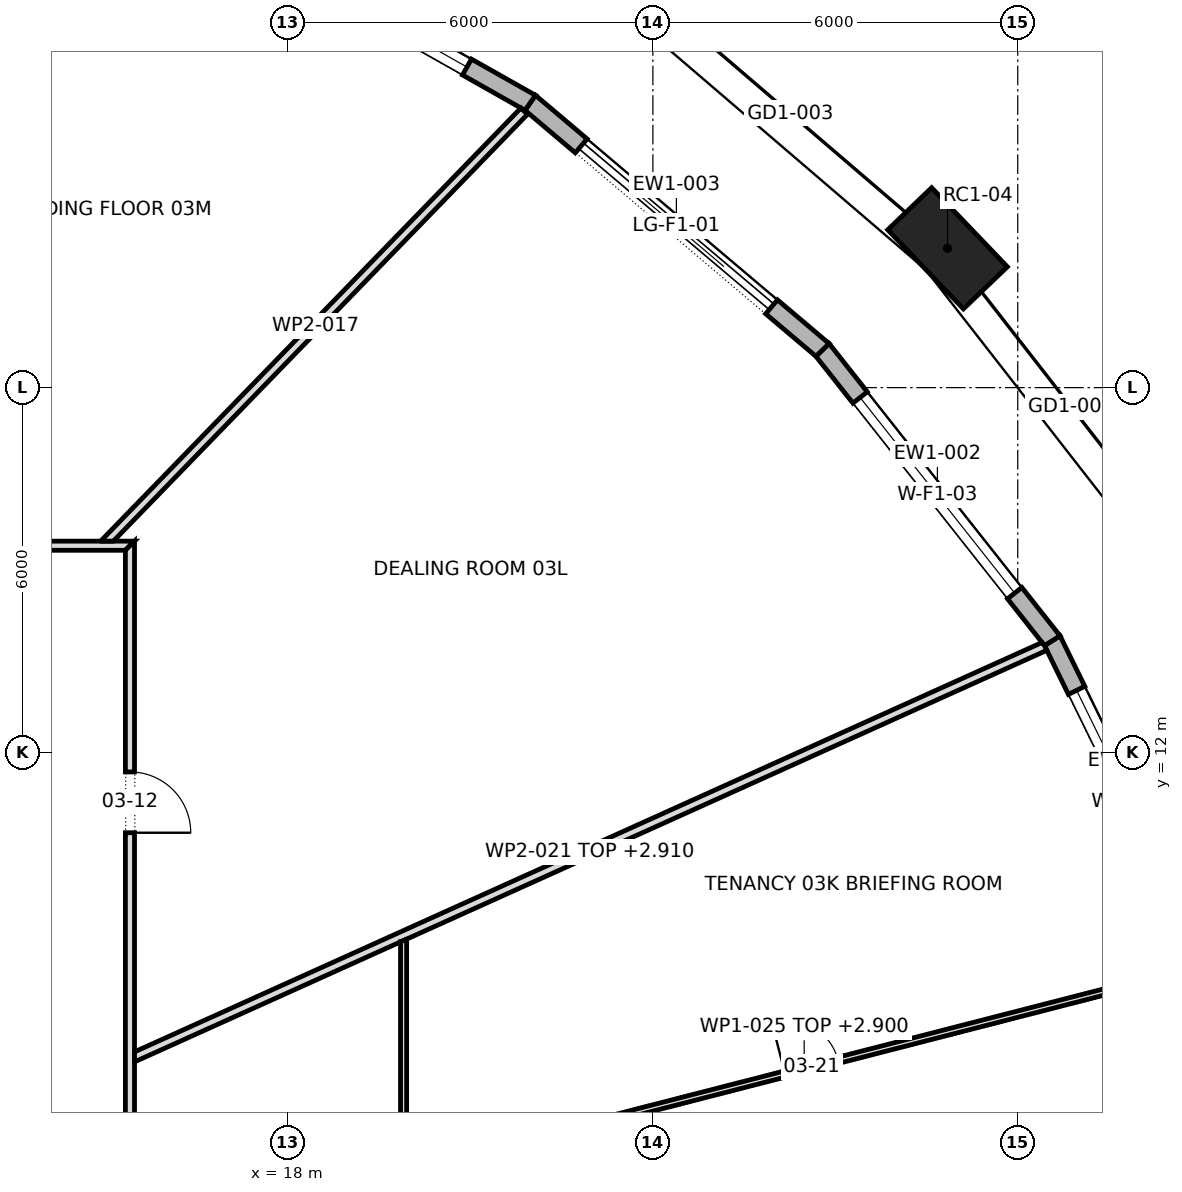
"""IFC4 building model, lengths in metres.
Left out: names, types, materials, properties, quantities, classifications, styles, units other than length and angle.
Written with IfcOpenShell. Run it as: python <this file> out.ifc"""

import sys

from ifc_helpers import new_model, si_unit, direction, frame, frame_2d, origin, origin_2d, place, context, subcontext, project, spatial, polyline, rectangle, outline, extrude, element, fill, save


model = new_model("IFC4")
c1 = context("Model", 3, precision=1e-05, world=origin(), true_north=direction((0.0, 1.0)))
c2 = subcontext(c1, "Body", "Model", "MODEL_VIEW")
j1 = project(units=[si_unit("LENGTHUNIT", "METRE"), si_unit("PLANEANGLEUNIT", "RADIAN")], contexts=[c1])
p1 = place(None, origin())
s1 = spatial("IfcSite", under=j1, at=p1, CompositionType="ELEMENT")
p2 = place(p1, origin())
s2 = spatial("IfcBuilding", under=s1, at=p2, CompositionType="ELEMENT")
p3 = place(p2, frame((0.0, 0.0, 48.7)))
s3 = spatial("IfcBuildingStorey", under=s2, at=p3, CompositionType="ELEMENT", Elevation=48.7)
p4 = place(p3, frame((28.845, 20.291, 0.0), z_axis=(0.0, 0.0, 1.0), x_axis=(-0.691576091297, 0.722303613411, 0.0)))
e1 = element("IfcColumn", 1, at=p4, inside=s3, PredefinedType="COLUMN", context=c2, shape_type="SweptSolid", body=[
    extrude(rectangle(XDim=1.8, YDim=1.0, at=origin_2d()), origin(), (0.0, 0.0, 1.0), 4.2),
])
p5 = place(p3, frame((33.172, 8.523, 0.0), z_axis=(0.0, 0.0, 1.0), x_axis=(-0.439906146647, 0.898043752911, 0.0)))
e2 = element("IfcWall", 2, at=p5, inside=s3, PredefinedType="STANDARD", context=c2, shape_type="SweptSolid", body=[
    extrude(outline(polyline([(-0.017, -0.15), (5.935, -0.15), (5.903, 0.15), (0.017, 0.15), (-0.017, -0.15)])), origin(), (0.0, 0.0, 1.0), 3.9),
])
p6 = place(p5, frame((0.909, 0.0, 0.6)))
e3 = element("IfcOpeningElement", 3, at=p6, cuts=e2, PredefinedType="OPENING", context=c2, shape_type="SweptSolid", body=[
    extrude(rectangle(XDim=4.1, YDim=2.85, at=frame_2d((2.05, 1.425))), frame((0.0, 0.162, 0.0), z_axis=(0.0, -1.0, 0.0), x_axis=(1.0, 0.0, 0.0)), (0.0, 0.0, 1.0), 0.324),
])
p7 = place(p3, frame((30.568, 13.838, 0.0), z_axis=(0.0, 0.0, 1.0), x_axis=(-0.619993638342, 0.78460683684, 0.0)))
e4 = element("IfcWall", 4, at=p7, inside=s3, PredefinedType="STANDARD", context=c2, shape_type="SweptSolid", body=[
    extrude(outline(polyline([(-0.016, -0.15), (6.109, -0.15), (6.079, 0.15), (0.016, 0.15), (-0.016, -0.15)])), origin(), (0.0, 0.0, 1.0), 3.9),
])
p8 = place(p7, frame((0.997, 0.0, 0.6)))
e5 = element("IfcOpeningElement", 5, at=p8, cuts=e4, PredefinedType="OPENING", context=c2, shape_type="SweptSolid", body=[
    extrude(rectangle(XDim=4.1, YDim=2.85, at=frame_2d((2.05, 1.425))), frame((0.0, 0.162, 0.0), z_axis=(0.0, -1.0, 0.0), x_axis=(1.0, 0.0, 0.0)), (0.0, 0.0, 1.0), 0.324),
])
p9 = place(p3, frame((26.79, 18.62, 0.0), z_axis=(0.0, 0.0, 1.0), x_axis=(-0.763614259808, 0.645672720671, 0.0)))
e6 = element("IfcWall", 6, at=p9, inside=s3, PredefinedType="STANDARD", context=c2, shape_type="SweptSolid", body=[
    extrude(outline(polyline([(-0.015, -0.15), (6.309, -0.15), (6.281, 0.15), (0.015, 0.15), (-0.015, -0.15)])), origin(), (0.0, 0.0, 1.0), 3.9),
])
p10 = place(p9, frame((1.097, 0.0, 0.0)))
e7 = element("IfcOpeningElement", 7, at=p10, cuts=e6, PredefinedType="OPENING", context=c2, shape_type="SweptSolid", body=[
    extrude(rectangle(XDim=4.1, YDim=3.45, at=frame_2d((2.05, 1.725))), frame((0.0, 0.162, 0.0), z_axis=(0.0, -1.0, 0.0), x_axis=(1.0, 0.0, 0.0)), (0.0, 0.0, 1.0), 0.324),
])
p11 = place(p3, frame((21.983, 22.684, 0.0), z_axis=(0.0, 0.0, 1.0), x_axis=(-0.870647609977, 0.491907246584, 0.0)))
e8 = element("IfcWall", 8, at=p11, inside=s3, PredefinedType="STANDARD", context=c2, shape_type="SweptSolid", body=[
    extrude(outline(polyline([(-0.014, -0.15), (6.503, -0.15), (6.476, 0.15), (0.014, 0.15), (-0.014, -0.15)])), origin(), (0.0, 0.0, 1.0), 3.9),
])
p12 = place(p11, frame((1.195, 0.0, 0.6)))
e9 = element("IfcOpeningElement", 9, at=p12, cuts=e8, PredefinedType="OPENING", context=c2, shape_type="SweptSolid", body=[
    extrude(rectangle(XDim=4.1, YDim=2.85, at=frame_2d((2.05, 1.425))), frame((0.0, 0.162, 0.0), z_axis=(0.0, -1.0, 0.0), x_axis=(1.0, 0.0, 0.0)), (0.0, 0.0, 1.0), 0.324),
])
p13 = place(p3, frame((-15.475, 15.4, 0.0), z_axis=(0.0, 0.0, 1.0), x_axis=(1.0, 0.0, 0.0)))
e10 = element("IfcWall", 10, at=p13, inside=s3, PredefinedType="PARTITIONING", context=c2, shape_type="SweptSolid", body=[
    extrude(outline(polyline([(0.15, -0.075), (2.066, -0.075), (3.981, -0.075), (5.897, -0.075), (7.812, -0.075), (9.728, -0.075), (11.644, -0.075), (13.56, -0.075), (15.475, -0.075), (17.391, -0.075), (19.306, -0.075), (21.222, -0.075), (23.138, -0.075), (25.053, -0.075), (26.969, -0.075), (28.885, -0.075), (30.8, -0.075), (30.95, 0.075), (29.016, 0.075), (27.081, 0.075), (25.147, 0.075), (23.212, 0.075), (21.278, 0.075), (19.344, 0.075), (17.409, 0.075), (15.475, 0.075), (13.541, 0.075), (11.606, 0.075), (9.672, 0.075), (7.738, 0.075), (5.803, 0.075), (3.869, 0.075), (1.935, 0.075), (0.0, 0.075), (0.15, -0.075)])), origin(), (0.0, 0.0, 1.0), 3.9),
])
p14 = place(p13, frame((16.84, 0.0, 0.0)))
e11 = element("IfcOpeningElement", 11, at=p14, cuts=e10, PredefinedType="OPENING", context=c2, shape_type="SweptSolid", body=[
    extrude(rectangle(XDim=1.0, YDim=2.1, at=frame_2d((0.5, 1.05))), frame((0.0, 0.087, 0.0), z_axis=(0.0, -1.0, 0.0), x_axis=(1.0, 0.0, 0.0)), (0.0, 0.0, 1.0), 0.174),
])
p15 = place(p13, frame((9.215, 0.0, 0.0)))
e12 = element("IfcOpeningElement", 12, at=p15, cuts=e10, PredefinedType="OPENING", context=c2, shape_type="SweptSolid", body=[
    extrude(rectangle(XDim=1.0, YDim=2.1, at=frame_2d((0.5, 1.05))), frame((0.0, 0.087, 0.0), z_axis=(0.0, -1.0, 0.0), x_axis=(1.0, 0.0, 0.0)), (0.0, 0.0, 1.0), 0.174),
])
p16 = place(p13, frame((25.21, 0.0, 0.0)))
e13 = element("IfcOpeningElement", 13, at=p16, cuts=e10, PredefinedType="OPENING", context=c2, shape_type="SweptSolid", body=[
    extrude(rectangle(XDim=1.0, YDim=2.1, at=frame_2d((0.5, 1.05))), frame((0.0, 0.087, 0.0), z_axis=(0.0, -1.0, 0.0), x_axis=(1.0, 0.0, 0.0)), (0.0, 0.0, 1.0), 0.174),
])
p17 = place(p3, frame((14.972, 15.423, 0.0), z_axis=(0.0, 0.0, 1.0), x_axis=(0.696324469813, 0.717727129722, 0.0)))
e14 = element("IfcWall", 14, at=p17, inside=s3, PredefinedType="PARTITIONING", context=c2, shape_type="SweptSolid", body=[
    extrude(outline(polyline([(0.0, 0.075), (0.0, 0.074), (0.145, -0.075), (2.101, -0.075), (4.057, -0.075), (6.012, -0.075), (7.968, -0.075), (9.924, -0.075), (9.924, 0.075), (7.939, 0.075), (5.954, 0.075), (3.97, 0.075), (1.985, 0.075), (0.0, 0.075)])), origin(), (0.0, 0.0, 1.0), 3.9),
])
p18 = place(p3, frame((15.4, -15.475, 0.0), z_axis=(0.0, 0.0, 1.0), x_axis=(0.0, 1.0, 0.0)))
e15 = element("IfcWall", 15, at=p18, inside=s3, PredefinedType="PARTITIONING", context=c2, shape_type="SweptSolid", body=[
    extrude(outline(polyline([(0.0, -0.075), (1.935, -0.075), (3.869, -0.075), (5.803, -0.075), (7.738, -0.075), (9.672, -0.075), (11.606, -0.075), (13.541, -0.075), (15.475, -0.075), (17.409, -0.075), (19.344, -0.075), (21.278, -0.075), (23.212, -0.075), (25.147, -0.075), (27.081, -0.075), (29.016, -0.075), (30.95, -0.075), (30.8, 0.075), (28.885, 0.075), (26.969, 0.075), (25.053, 0.075), (23.138, 0.075), (21.222, 0.075), (19.306, 0.075), (17.391, 0.075), (15.475, 0.075), (13.56, 0.075), (11.644, 0.075), (9.728, 0.075), (7.812, 0.075), (5.897, 0.075), (3.981, 0.075), (2.066, 0.075), (0.15, 0.075), (0.0, -0.075)])), origin(), (0.0, 0.0, 1.0), 3.9),
])
p19 = place(p18, frame((8.99, 0.0, 0.0)))
e16 = element("IfcOpeningElement", 16, at=p19, cuts=e15, PredefinedType="OPENING", context=c2, shape_type="SweptSolid", body=[
    extrude(rectangle(XDim=1.0, YDim=2.1, at=frame_2d((0.5, 1.05))), frame((0.0, 0.087, 0.0), z_axis=(0.0, -1.0, 0.0), x_axis=(1.0, 0.0, 0.0)), (0.0, 0.0, 1.0), 0.174),
])
p20 = place(p18, frame((17.815, 0.0, 0.0)))
e17 = element("IfcOpeningElement", 17, at=p20, cuts=e15, PredefinedType="OPENING", context=c2, shape_type="SweptSolid", body=[
    extrude(rectangle(XDim=1.0, YDim=2.1, at=frame_2d((0.5, 1.05))), frame((0.0, 0.087, 0.0), z_axis=(0.0, -1.0, 0.0), x_axis=(1.0, 0.0, 0.0)), (0.0, 0.0, 1.0), 0.174),
])
p21 = place(p18, frame((26.155, 0.0, 0.0)))
e18 = element("IfcOpeningElement", 18, at=p21, cuts=e15, PredefinedType="OPENING", context=c2, shape_type="SweptSolid", body=[
    extrude(rectangle(XDim=1.0, YDim=2.1, at=frame_2d((0.5, 1.05))), frame((0.0, 0.087, 0.0), z_axis=(0.0, -1.0, 0.0), x_axis=(1.0, 0.0, 0.0)), (0.0, 0.0, 1.0), 0.174),
])
p22 = place(p3, frame((15.444, 6.98, 0.0), z_axis=(0.0, 0.0, 1.0), x_axis=(0.911545333682, 0.411199592221, 0.0)))
e19 = element("IfcWall", 19, at=p22, inside=s3, PredefinedType="PARTITIONING", context=c2, shape_type="SweptSolid", body=[
    extrude(outline(polyline([(0.0, -0.075), (1.6, -0.075), (3.2, -0.075), (4.8, -0.075), (4.801, -0.073), (4.805, -0.075), (6.747, -0.075), (8.69, -0.075), (10.632, -0.075), (12.574, -0.075), (14.517, -0.075), (16.459, -0.075), (16.459, -0.072), (16.457, 0.012), (16.441, 0.075), (14.622, 0.075), (12.802, 0.075), (10.983, 0.075), (9.164, 0.075), (7.345, 0.075), (5.525, 0.075), (3.706, 0.075), (1.887, 0.075), (0.068, 0.075), (0.0, -0.075)])), origin(), (0.0, 0.0, 1.0), 2.91),
])
p23 = place(p3, frame((19.9, -1.585, 0.0), z_axis=(0.0, 0.0, 1.0), x_axis=(0.0, 1.0, 0.0)))
e20 = element("IfcWall", 20, at=p23, inside=s3, PredefinedType="PARTITIONING", context=c2, shape_type="SweptSolid", body=[
    extrude(outline(polyline([(0.0, -0.05), (1.686, -0.05), (3.371, -0.05), (5.056, -0.05), (6.742, -0.05), (6.749, -0.048), (6.75, -0.05), (8.632, -0.05), (10.515, -0.05), (10.515, -0.049), (10.47, 0.05), (8.726, 0.05), (6.983, 0.05), (5.239, 0.05), (3.495, 0.05), (1.752, 0.05), (0.008, 0.05), (0.0, -0.046), (0.0, -0.05)])), origin(), (0.0, 0.0, 1.0), 3.9),
])
p24 = place(p23, frame((2.855, 0.0, 0.0)))
e21 = element("IfcOpeningElement", 21, at=p24, cuts=e20, PredefinedType="OPENING", context=c2, shape_type="SweptSolid", body=[
    extrude(rectangle(XDim=0.9, YDim=2.1, at=frame_2d((0.45, 1.05))), frame((0.0, 0.062, 0.0), z_axis=(0.0, -1.0, 0.0), x_axis=(1.0, 0.0, 0.0)), (0.0, 0.0, 1.0), 0.124),
])
p25 = place(p3, frame((19.938, 5.11, 0.0), z_axis=(0.0, 0.0, 1.0), x_axis=(0.968505877435, 0.248990693348, 0.0)))
e22 = element("IfcWall", 22, at=p25, inside=s3, PredefinedType="PARTITIONING", context=c2, shape_type="SweptSolid", body=[
    extrude(outline(polyline([(13.515, -0.05), (13.515, 0.003), (13.506, 0.05), (11.58, 0.05), (9.654, 0.05), (7.729, 0.05), (5.803, 0.05), (3.877, 0.05), (1.951, 0.05), (0.026, 0.05), (0.0, -0.049), (0.0, -0.05), (1.931, -0.05), (3.862, -0.05), (5.792, -0.05), (7.723, -0.05), (9.654, -0.05), (11.585, -0.05), (13.515, -0.05)])), origin(), (0.0, 0.0, 1.0), 2.9),
])
p26 = place(p25, frame((6.439, 0.0, 0.0)))
e23 = element("IfcOpeningElement", 23, at=p26, cuts=e22, PredefinedType="OPENING", context=c2, shape_type="SweptSolid", body=[
    extrude(rectangle(XDim=0.9, YDim=2.1, at=frame_2d((0.45, 1.05))), frame((0.0, 0.062, 0.0), z_axis=(0.0, -1.0, 0.0), x_axis=(1.0, 0.0, 0.0)), (0.0, 0.0, 1.0), 0.124),
])
p27 = place(p6, origin())
e24 = element("IfcWindow", 24, at=p27, inside=s3, PartitioningType="TRIPLE_PANEL_VERTICAL", PredefinedType="WINDOW", context=c2, shape_type="SweptSolid", body=[
    extrude(rectangle(XDim=4.1, YDim=2.85, at=frame_2d((2.05, 1.425))), frame((0.0, 0.03, 0.0), z_axis=(0.0, -1.0, 0.0), x_axis=(1.0, 0.0, 0.0)), (0.0, 0.0, 1.0), 0.06),
])
fill(e3, e24)
p28 = place(p8, origin())
e25 = element("IfcWindow", 25, at=p28, inside=s3, PartitioningType="TRIPLE_PANEL_VERTICAL", PredefinedType="WINDOW", context=c2, shape_type="SweptSolid", body=[
    extrude(rectangle(XDim=4.1, YDim=2.85, at=frame_2d((2.05, 1.425))), frame((0.0, 0.03, 0.0), z_axis=(0.0, -1.0, 0.0), x_axis=(1.0, 0.0, 0.0)), (0.0, 0.0, 1.0), 0.06),
])
fill(e5, e25)
p29 = place(p10, origin())
e26 = element("IfcDoor", 26, at=p29, inside=s3, OperationType="DOUBLE_DOOR_SLIDING", PredefinedType="DOOR", context=c2, shape_type="SweptSolid", body=[
    extrude(rectangle(XDim=4.1, YDim=3.45, at=frame_2d((2.05, 1.725))), frame((0.0, 0.025, 0.0), z_axis=(0.0, -1.0, 0.0), x_axis=(1.0, 0.0, 0.0)), (0.0, 0.0, 1.0), 0.05),
])
fill(e7, e26)
p30 = place(p12, origin())
e27 = element("IfcWindow", 27, at=p30, inside=s3, PartitioningType="TRIPLE_PANEL_VERTICAL", PredefinedType="WINDOW", context=c2, shape_type="SweptSolid", body=[
    extrude(rectangle(XDim=4.1, YDim=2.85, at=frame_2d((2.05, 1.425))), frame((0.0, 0.03, 0.0), z_axis=(0.0, -1.0, 0.0), x_axis=(1.0, 0.0, 0.0)), (0.0, 0.0, 1.0), 0.06),
])
fill(e9, e27)
p31 = place(p21, frame((1.0, 0.0, 0.0), z_axis=(0.0, 0.0, 1.0), x_axis=(-1.0, 0.0, 0.0)))
e28 = element("IfcDoor", 28, at=p31, inside=s3, OperationType="SINGLE_SWING_LEFT", PredefinedType="DOOR", context=c2, shape_type="SweptSolid", body=[
    extrude(rectangle(XDim=1.0, YDim=2.1, at=frame_2d((0.5, 1.05))), frame((0.0, 0.025, 0.0), z_axis=(0.0, -1.0, 0.0), x_axis=(1.0, 0.0, 0.0)), (0.0, 0.0, 1.0), 0.05),
])
fill(e18, e28)
p32 = place(p26, origin())
e29 = element("IfcDoor", 29, at=p32, inside=s3, OperationType="SINGLE_SWING_RIGHT", PredefinedType="DOOR", context=c2, shape_type="SweptSolid", body=[
    extrude(rectangle(XDim=0.9, YDim=2.1, at=frame_2d((0.45, 1.05))), frame((0.0, 0.025, 0.0), z_axis=(0.0, -1.0, 0.0), x_axis=(1.0, 0.0, 0.0)), (0.0, 0.0, 1.0), 0.05),
])
fill(e23, e29)
save(model, sys.argv[1])
